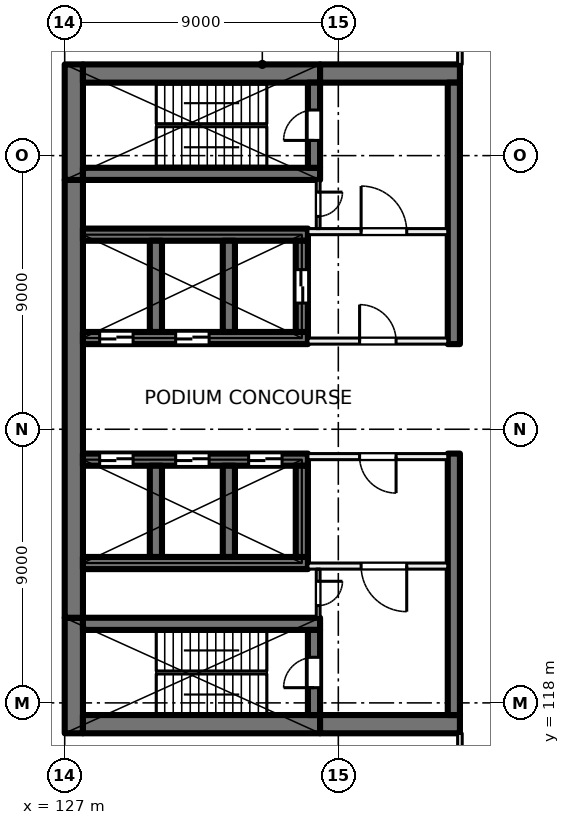
"""IFC4 building model, lengths in metres.
Left out: names, types, materials, properties, quantities, classifications, styles, units other than length and angle.
Written with IfcOpenShell. Run it as: python <this file> out.ifc"""

import sys

from ifc_helpers import new_model, si_unit, direction, frame, frame_2d, origin, place, context, subcontext, project, spatial, rectangle, extrude, element, fill, save


model = new_model("IFC4")
c1 = context("Model", 3, precision=1e-05, world=origin(), true_north=direction((0.0, 1.0)))
c2 = subcontext(c1, "Body", "Model", "MODEL_VIEW")
j1 = project(units=[si_unit("LENGTHUNIT", "METRE"), si_unit("PLANEANGLEUNIT", "RADIAN")], contexts=[c1])
p1 = place(None, origin())
s1 = spatial("IfcSite", under=j1, at=p1, CompositionType="ELEMENT")
p2 = place(p1, origin())
s2 = spatial("IfcBuilding", under=s1, at=p2, CompositionType="ELEMENT")
p3 = place(p2, frame((0.0, 0.0, 22.5)))
s3 = spatial("IfcBuildingStorey", under=s2, at=p3, CompositionType="ELEMENT", Elevation=22.5)
p4 = place(p3, frame((127.3, 117.0, 0.0), z_axis=(0.0, 0.0, 1.0), x_axis=(0.0, 1.0, 0.0)))
e1 = element("IfcWall", 1, at=p4, inside=s3, PredefinedType="SHEAR", context=c2, shape_type="SweptSolid", body=[
    extrude(rectangle(XDim=3.8, YDim=0.6, at=frame_2d((1.9, 0.0))), origin(), (0.0, 0.0, 1.0), 5.0),
])
p5 = place(p3, frame((127.3, 120.8, 0.0), z_axis=(0.0, 0.0, 1.0), x_axis=(0.0, 1.0, 0.0)))
e2 = element("IfcWall", 2, at=p5, inside=s3, PredefinedType="SHEAR", context=c2, shape_type="SweptSolid", body=[
    extrude(rectangle(XDim=14.4, YDim=0.6, at=frame_2d((7.2, 0.0))), origin(), (0.0, 0.0, 1.0), 5.0),
])
p6 = place(p3, frame((127.3, 135.2, 0.0), z_axis=(0.0, 0.0, 1.0), x_axis=(0.0, 1.0, 0.0)))
e3 = element("IfcWall", 3, at=p6, inside=s3, PredefinedType="SHEAR", context=c2, shape_type="SweptSolid", body=[
    extrude(rectangle(XDim=3.8, YDim=0.6, at=frame_2d((1.9, 0.0))), origin(), (0.0, 0.0, 1.0), 5.0),
])
for number, where, z_axis, x_axis in (
    (4, (127.6, 117.3, 0.0), (0.0, 0.0, 1.0), (1.0, 0.0, 0.0)),
    (5, (127.6, 138.7, 0.0), (0.0, 0.0, 1.0), (1.0, 0.0, 0.0)),
):
    element("IfcWall", number, at=place(p3, frame(where, z_axis=z_axis, x_axis=x_axis)), inside=s3, PredefinedType="SHEAR", context=c2, shape_type="SweptSolid", body=[
        extrude(rectangle(XDim=7.8, YDim=0.6, at=frame_2d((3.9, 0.0))), origin(), (0.0, 0.0, 1.0), 5.0),
    ])
for number, where, z_axis, x_axis in (
    (6, (135.4, 117.3, 0.0), (0.0, 0.0, 1.0), (1.0, 0.0, 0.0)),
    (7, (135.4, 138.7, 0.0), (0.0, 0.0, 1.0), (1.0, 0.0, 0.0)),
):
    element("IfcWall", number, at=place(p3, frame(where, z_axis=z_axis, x_axis=x_axis)), inside=s3, PredefinedType="SHEAR", context=c2, shape_type="SweptSolid", body=[
        extrude(rectangle(XDim=4.6, YDim=0.6, at=frame_2d((2.3, 0.0))), origin(), (0.0, 0.0, 1.0), 5.0),
    ])
p7 = place(p3, frame((127.6, 120.6, 0.0), z_axis=(0.0, 0.0, 1.0), x_axis=(1.0, 0.0, 0.0)))
e8 = element("IfcWall", 8, at=p7, inside=s3, PredefinedType="SHEAR", context=c2, shape_type="SweptSolid", body=[
    extrude(rectangle(XDim=7.8, YDim=0.4, at=frame_2d((3.9, 0.0))), origin(), (0.0, 0.0, 1.0), 5.0),
])
p8 = place(p3, frame((135.2, 117.6, 0.0), z_axis=(0.0, 0.0, 1.0), x_axis=(0.0, 1.0, 0.0)))
e9 = element("IfcWall", 9, at=p8, inside=s3, PredefinedType="SHEAR", context=c2, shape_type="SweptSolid", body=[
    extrude(rectangle(XDim=2.8, YDim=0.4, at=frame_2d((1.4, 0.0))), origin(), (0.0, 0.0, 1.0), 5.0),
])
p9 = place(p8, frame((0.9, 0.0, 0.0)))
e10 = element("IfcOpeningElement", 10, at=p9, cuts=e9, PredefinedType="OPENING", context=c2, shape_type="SweptSolid", body=[
    extrude(rectangle(XDim=1.0, YDim=2.1, at=frame_2d((0.5, 1.05))), frame((0.0, 0.21, 0.0), z_axis=(0.0, -1.0, 0.0), x_axis=(1.0, 0.0, 0.0)), (0.0, 0.0, 1.0), 0.42),
])
p10 = place(p3, frame((127.6, 135.4, 0.0), z_axis=(0.0, 0.0, 1.0), x_axis=(1.0, 0.0, 0.0)))
e11 = element("IfcWall", 11, at=p10, inside=s3, PredefinedType="SHEAR", context=c2, shape_type="SweptSolid", body=[
    extrude(rectangle(XDim=7.8, YDim=0.4, at=frame_2d((3.9, 0.0))), origin(), (0.0, 0.0, 1.0), 5.0),
])
p11 = place(p3, frame((135.2, 135.6, 0.0), z_axis=(0.0, 0.0, 1.0), x_axis=(0.0, 1.0, 0.0)))
e12 = element("IfcWall", 12, at=p11, inside=s3, PredefinedType="SHEAR", context=c2, shape_type="SweptSolid", body=[
    extrude(rectangle(XDim=2.8, YDim=0.4, at=frame_2d((1.4, 0.0))), origin(), (0.0, 0.0, 1.0), 5.0),
])
p12 = place(p11, frame((0.9, 0.0, 0.0)))
e13 = element("IfcOpeningElement", 13, at=p12, cuts=e12, PredefinedType="OPENING", context=c2, shape_type="SweptSolid", body=[
    extrude(rectangle(XDim=1.0, YDim=2.1, at=frame_2d((0.5, 1.05))), frame((0.0, 0.21, 0.0), z_axis=(0.0, -1.0, 0.0), x_axis=(1.0, 0.0, 0.0)), (0.0, 0.0, 1.0), 0.42),
])
p13 = place(p3, frame((127.6, 126.0, 0.0), z_axis=(0.0, 0.0, 1.0), x_axis=(1.0, 0.0, 0.0)))
e14 = element("IfcWall", 14, at=p13, inside=s3, PredefinedType="SHEAR", context=c2, shape_type="SweptSolid", body=[
    extrude(rectangle(XDim=7.4, YDim=0.4, at=frame_2d((3.7, 0.0))), origin(), (0.0, 0.0, 1.0), 5.0),
])
p14 = place(p13, frame((0.55, 0.0, 0.0)))
e15 = element("IfcOpeningElement", 15, at=p14, cuts=e14, PredefinedType="OPENING", context=c2, shape_type="SweptSolid", body=[
    extrude(rectangle(XDim=1.1, YDim=2.1, at=frame_2d((0.55, 1.05))), frame((0.0, 0.21, 0.0), z_axis=(0.0, -1.0, 0.0), x_axis=(1.0, 0.0, 0.0)), (0.0, 0.0, 1.0), 0.42),
])
p15 = place(p13, frame((3.05, 0.0, 0.0)))
e16 = element("IfcOpeningElement", 16, at=p15, cuts=e14, PredefinedType="OPENING", context=c2, shape_type="SweptSolid", body=[
    extrude(rectangle(XDim=1.1, YDim=2.1, at=frame_2d((0.55, 1.05))), frame((0.0, 0.21, 0.0), z_axis=(0.0, -1.0, 0.0), x_axis=(1.0, 0.0, 0.0)), (0.0, 0.0, 1.0), 0.42),
])
p16 = place(p13, frame((5.45, 0.0, 0.0)))
e17 = element("IfcOpeningElement", 17, at=p16, cuts=e14, PredefinedType="OPENING", context=c2, shape_type="SweptSolid", body=[
    extrude(rectangle(XDim=1.1, YDim=2.1, at=frame_2d((0.55, 1.05))), frame((0.0, 0.21, 0.0), z_axis=(0.0, -1.0, 0.0), x_axis=(1.0, 0.0, 0.0)), (0.0, 0.0, 1.0), 0.42),
])
p17 = place(p3, frame((127.6, 122.6, 0.0), z_axis=(0.0, 0.0, 1.0), x_axis=(1.0, 0.0, 0.0)))
e18 = element("IfcWall", 18, at=p17, inside=s3, PredefinedType="SHEAR", context=c2, shape_type="SweptSolid", body=[
    extrude(rectangle(XDim=7.4, YDim=0.4, at=frame_2d((3.7, 0.0))), origin(), (0.0, 0.0, 1.0), 5.0),
])
for number, where, z_axis, x_axis in (
    (19, (130.0, 122.8, 0.0), (0.0, 0.0, 1.0), (0.0, 1.0, 0.0)),
    (20, (132.4, 122.8, 0.0), (0.0, 0.0, 1.0), (0.0, 1.0, 0.0)),
    (21, (134.8, 122.8, 0.0), (0.0, 0.0, 1.0), (0.0, 1.0, 0.0)),
):
    element("IfcWall", number, at=place(p3, frame(where, z_axis=z_axis, x_axis=x_axis)), inside=s3, PredefinedType="SHEAR", context=c2, shape_type="SweptSolid", body=[
        extrude(rectangle(XDim=3.0, YDim=0.4, at=frame_2d((1.5, 0.0))), origin(), (0.0, 0.0, 1.0), 5.0),
    ])
p18 = place(p3, frame((127.6, 130.0, 0.0), z_axis=(0.0, 0.0, 1.0), x_axis=(1.0, 0.0, 0.0)))
e22 = element("IfcWall", 22, at=p18, inside=s3, PredefinedType="SHEAR", context=c2, shape_type="SweptSolid", body=[
    extrude(rectangle(XDim=7.4, YDim=0.4, at=frame_2d((3.7, 0.0))), origin(), (0.0, 0.0, 1.0), 5.0),
])
p19 = place(p18, frame((0.55, 0.0, 0.0)))
e23 = element("IfcOpeningElement", 23, at=p19, cuts=e22, PredefinedType="OPENING", context=c2, shape_type="SweptSolid", body=[
    extrude(rectangle(XDim=1.1, YDim=2.1, at=frame_2d((0.55, 1.05))), frame((0.0, 0.21, 0.0), z_axis=(0.0, -1.0, 0.0), x_axis=(1.0, 0.0, 0.0)), (0.0, 0.0, 1.0), 0.42),
])
p20 = place(p18, frame((3.05, 0.0, 0.0)))
e24 = element("IfcOpeningElement", 24, at=p20, cuts=e22, PredefinedType="OPENING", context=c2, shape_type="SweptSolid", body=[
    extrude(rectangle(XDim=1.1, YDim=2.1, at=frame_2d((0.55, 1.05))), frame((0.0, 0.21, 0.0), z_axis=(0.0, -1.0, 0.0), x_axis=(1.0, 0.0, 0.0)), (0.0, 0.0, 1.0), 0.42),
])
p21 = place(p3, frame((127.6, 133.4, 0.0), z_axis=(0.0, 0.0, 1.0), x_axis=(1.0, 0.0, 0.0)))
e25 = element("IfcWall", 25, at=p21, inside=s3, PredefinedType="SHEAR", context=c2, shape_type="SweptSolid", body=[
    extrude(rectangle(XDim=7.4, YDim=0.4, at=frame_2d((3.7, 0.0))), origin(), (0.0, 0.0, 1.0), 5.0),
])
for number, where, z_axis, x_axis in (
    (26, (130.0, 130.2, 0.0), (0.0, 0.0, 1.0), (0.0, 1.0, 0.0)),
    (27, (132.4, 130.2, 0.0), (0.0, 0.0, 1.0), (0.0, 1.0, 0.0)),
):
    element("IfcWall", number, at=place(p3, frame(where, z_axis=z_axis, x_axis=x_axis)), inside=s3, PredefinedType="SHEAR", context=c2, shape_type="SweptSolid", body=[
        extrude(rectangle(XDim=3.0, YDim=0.4, at=frame_2d((1.5, 0.0))), origin(), (0.0, 0.0, 1.0), 5.0),
    ])
p22 = place(p3, frame((134.8, 130.2, 0.0), z_axis=(0.0, 0.0, 1.0), x_axis=(0.0, 1.0, 0.0)))
e28 = element("IfcWall", 28, at=p22, inside=s3, PredefinedType="SHEAR", context=c2, shape_type="SweptSolid", body=[
    extrude(rectangle(XDim=3.0, YDim=0.4, at=frame_2d((1.5, 0.0))), origin(), (0.0, 0.0, 1.0), 5.0),
])
p23 = place(p22, frame((0.95, 0.0, 0.0)))
e29 = element("IfcOpeningElement", 29, at=p23, cuts=e28, PredefinedType="OPENING", context=c2, shape_type="SweptSolid", body=[
    extrude(rectangle(XDim=1.1, YDim=2.1, at=frame_2d((0.55, 1.05))), frame((0.0, 0.21, 0.0), z_axis=(0.0, -1.0, 0.0), x_axis=(1.0, 0.0, 0.0)), (0.0, 0.0, 1.0), 0.42),
])
for number, where, z_axis, x_axis in (
    (30, (139.8, 117.6, 0.0), (0.0, 0.0, 1.0), (0.0, 1.0, 0.0)),
    (31, (139.8, 129.8, 0.0), (0.0, 0.0, 1.0), (0.0, 1.0, 0.0)),
):
    element("IfcWall", number, at=place(p3, frame(where, z_axis=z_axis, x_axis=x_axis)), inside=s3, PredefinedType="SHEAR", context=c2, shape_type="SweptSolid", body=[
        extrude(rectangle(XDim=8.6, YDim=0.4, at=frame_2d((4.3, 0.0))), origin(), (0.0, 0.0, 1.0), 5.0),
    ])
p24 = place(p3, frame((135.0, 129.9, 0.0), z_axis=(0.0, 0.0, 1.0), x_axis=(1.0, 0.0, 0.0)))
e32 = element("IfcWall", 32, at=p24, inside=s3, PredefinedType="PARTITIONING", context=c2, shape_type="SweptSolid", body=[
    extrude(rectangle(XDim=4.6, YDim=0.2, at=frame_2d((2.3, 0.0))), origin(), (0.0, 0.0, 1.0), 4.625),
])
p25 = place(p24, frame((1.7, 0.0, 0.0)))
e33 = element("IfcOpeningElement", 33, at=p25, cuts=e32, PredefinedType="OPENING", context=c2, shape_type="SweptSolid", body=[
    extrude(rectangle(XDim=1.2, YDim=2.1, at=frame_2d((0.6, 1.05))), frame((0.0, 0.11, 0.0), z_axis=(0.0, -1.0, 0.0), x_axis=(1.0, 0.0, 0.0)), (0.0, 0.0, 1.0), 0.22),
])
p26 = place(p3, frame((135.0, 133.5, 0.0), z_axis=(0.0, 0.0, 1.0), x_axis=(1.0, 0.0, 0.0)))
e34 = element("IfcWall", 34, at=p26, inside=s3, PredefinedType="PARTITIONING", context=c2, shape_type="SweptSolid", body=[
    extrude(rectangle(XDim=4.6, YDim=0.2, at=frame_2d((2.3, 0.0))), origin(), (0.0, 0.0, 1.0), 4.625),
])
p27 = place(p26, frame((1.75, 0.0, 0.0)))
e35 = element("IfcOpeningElement", 35, at=p27, cuts=e34, PredefinedType="OPENING", context=c2, shape_type="SweptSolid", body=[
    extrude(rectangle(XDim=1.5, YDim=2.1, at=frame_2d((0.75, 1.05))), frame((0.0, 0.11, 0.0), z_axis=(0.0, -1.0, 0.0), x_axis=(1.0, 0.0, 0.0)), (0.0, 0.0, 1.0), 0.22),
])
p28 = place(p3, frame((135.337, 135.2, 0.0), z_axis=(0.0, 0.0, 1.0), x_axis=(0.0, -1.0, 0.0)))
e36 = element("IfcWall", 36, at=p28, inside=s3, PredefinedType="PARTITIONING", context=c2, shape_type="SweptSolid", body=[
    extrude(rectangle(XDim=1.6, YDim=0.125, at=frame_2d((0.8, 0.0))), origin(), (0.0, 0.0, 1.0), 4.625),
])
p29 = place(p28, frame((0.4, 0.0, 0.0)))
e37 = element("IfcOpeningElement", 37, at=p29, cuts=e36, PredefinedType="OPENING", context=c2, shape_type="SweptSolid", body=[
    extrude(rectangle(XDim=0.8, YDim=2.1, at=frame_2d((0.4, 1.05))), frame((0.0, 0.073, 0.0), z_axis=(0.0, -1.0, 0.0), x_axis=(1.0, 0.0, 0.0)), (0.0, 0.0, 1.0), 0.145),
])
p30 = place(p3, frame((139.6, 126.1, 0.0), z_axis=(0.0, 0.0, 1.0), x_axis=(-1.0, 0.0, 0.0)))
e38 = element("IfcWall", 38, at=p30, inside=s3, PredefinedType="PARTITIONING", context=c2, shape_type="SweptSolid", body=[
    extrude(rectangle(XDim=4.6, YDim=0.2, at=frame_2d((2.3, 0.0))), origin(), (0.0, 0.0, 1.0), 4.625),
])
p31 = place(p30, frame((1.7, 0.0, 0.0)))
e39 = element("IfcOpeningElement", 39, at=p31, cuts=e38, PredefinedType="OPENING", context=c2, shape_type="SweptSolid", body=[
    extrude(rectangle(XDim=1.2, YDim=2.1, at=frame_2d((0.6, 1.05))), frame((0.0, 0.11, 0.0), z_axis=(0.0, -1.0, 0.0), x_axis=(1.0, 0.0, 0.0)), (0.0, 0.0, 1.0), 0.22),
])
p32 = place(p3, frame((139.6, 122.5, 0.0), z_axis=(0.0, 0.0, 1.0), x_axis=(-1.0, 0.0, 0.0)))
e40 = element("IfcWall", 40, at=p32, inside=s3, PredefinedType="PARTITIONING", context=c2, shape_type="SweptSolid", body=[
    extrude(rectangle(XDim=4.6, YDim=0.2, at=frame_2d((2.3, 0.0))), origin(), (0.0, 0.0, 1.0), 4.625),
])
p33 = place(p32, frame((1.35, 0.0, 0.0)))
e41 = element("IfcOpeningElement", 41, at=p33, cuts=e40, PredefinedType="OPENING", context=c2, shape_type="SweptSolid", body=[
    extrude(rectangle(XDim=1.5, YDim=2.1, at=frame_2d((0.75, 1.05))), frame((0.0, 0.11, 0.0), z_axis=(0.0, -1.0, 0.0), x_axis=(1.0, 0.0, 0.0)), (0.0, 0.0, 1.0), 0.22),
])
p34 = place(p3, frame((135.337, 122.4, 0.0), z_axis=(0.0, 0.0, 1.0), x_axis=(0.0, -1.0, 0.0)))
e42 = element("IfcWall", 42, at=p34, inside=s3, PredefinedType="PARTITIONING", context=c2, shape_type="SweptSolid", body=[
    extrude(rectangle(XDim=1.6, YDim=0.125, at=frame_2d((0.8, 0.0))), origin(), (0.0, 0.0, 1.0), 4.625),
])
p35 = place(p34, frame((0.4, 0.0, 0.0)))
e43 = element("IfcOpeningElement", 43, at=p35, cuts=e42, PredefinedType="OPENING", context=c2, shape_type="SweptSolid", body=[
    extrude(rectangle(XDim=0.8, YDim=2.1, at=frame_2d((0.4, 1.05))), frame((0.0, 0.073, 0.0), z_axis=(0.0, -1.0, 0.0), x_axis=(1.0, 0.0, 0.0)), (0.0, 0.0, 1.0), 0.145),
])
p36 = place(p3, frame((140.0, 102.925, 0.0), z_axis=(0.0, 0.0, 1.0), x_axis=(0.0, 1.0, 0.0)))
e44 = element("IfcWall", 44, at=p36, inside=s3, PredefinedType="PARTITIONING", context=c2, shape_type="SweptSolid", body=[
    extrude(rectangle(XDim=14.075, YDim=0.15, at=frame_2d((7.038, 0.0))), origin(), (0.0, 0.0, 1.0), 4.625),
])
p37 = place(p36, frame((10.675, 0.0, 0.0)))
e45 = element("IfcOpeningElement", 45, at=p37, cuts=e44, PredefinedType="OPENING", context=c2, shape_type="SweptSolid", body=[
    extrude(rectangle(XDim=1.8, YDim=2.1, at=frame_2d((0.9, 1.05))), frame((0.0, 0.085, 0.0), z_axis=(0.0, -1.0, 0.0), x_axis=(1.0, 0.0, 0.0)), (0.0, 0.0, 1.0), 0.17),
])
p38 = place(p3, frame((140.0, 139.0, 0.0), z_axis=(0.0, 0.0, 1.0), x_axis=(0.0, 1.0, 0.0)))
e46 = element("IfcWall", 46, at=p38, inside=s3, PredefinedType="PARTITIONING", context=c2, shape_type="SweptSolid", body=[
    extrude(rectangle(XDim=14.4, YDim=0.15, at=frame_2d((7.2, 0.0))), origin(), (0.0, 0.0, 1.0), 4.625),
])
p39 = place(p19, origin())
e47 = element("IfcDoor", 47, at=p39, inside=s3, OperationType="DOUBLE_DOOR_SLIDING", PredefinedType="DOOR", context=c2, shape_type="SweptSolid", body=[
    extrude(rectangle(XDim=1.1, YDim=2.1, at=frame_2d((0.55, 1.05))), frame((0.0, 0.025, 0.0), z_axis=(0.0, -1.0, 0.0), x_axis=(1.0, 0.0, 0.0)), (0.0, 0.0, 1.0), 0.05),
])
fill(e23, e47)
p40 = place(p20, origin())
e48 = element("IfcDoor", 48, at=p40, inside=s3, OperationType="DOUBLE_DOOR_SLIDING", PredefinedType="DOOR", context=c2, shape_type="SweptSolid", body=[
    extrude(rectangle(XDim=1.1, YDim=2.1, at=frame_2d((0.55, 1.05))), frame((0.0, 0.025, 0.0), z_axis=(0.0, -1.0, 0.0), x_axis=(1.0, 0.0, 0.0)), (0.0, 0.0, 1.0), 0.05),
])
fill(e24, e48)
p41 = place(p14, origin())
e49 = element("IfcDoor", 49, at=p41, inside=s3, OperationType="DOUBLE_DOOR_SLIDING", PredefinedType="DOOR", context=c2, shape_type="SweptSolid", body=[
    extrude(rectangle(XDim=1.1, YDim=2.1, at=frame_2d((0.55, 1.05))), frame((0.0, 0.025, 0.0), z_axis=(0.0, -1.0, 0.0), x_axis=(1.0, 0.0, 0.0)), (0.0, 0.0, 1.0), 0.05),
])
fill(e15, e49)
p42 = place(p15, origin())
e50 = element("IfcDoor", 50, at=p42, inside=s3, OperationType="DOUBLE_DOOR_SLIDING", PredefinedType="DOOR", context=c2, shape_type="SweptSolid", body=[
    extrude(rectangle(XDim=1.1, YDim=2.1, at=frame_2d((0.55, 1.05))), frame((0.0, 0.025, 0.0), z_axis=(0.0, -1.0, 0.0), x_axis=(1.0, 0.0, 0.0)), (0.0, 0.0, 1.0), 0.05),
])
fill(e16, e50)
p43 = place(p16, origin())
e51 = element("IfcDoor", 51, at=p43, inside=s3, OperationType="DOUBLE_DOOR_SLIDING", PredefinedType="DOOR", context=c2, shape_type="SweptSolid", body=[
    extrude(rectangle(XDim=1.1, YDim=2.1, at=frame_2d((0.55, 1.05))), frame((0.0, 0.025, 0.0), z_axis=(0.0, -1.0, 0.0), x_axis=(1.0, 0.0, 0.0)), (0.0, 0.0, 1.0), 0.05),
])
fill(e17, e51)
p44 = place(p25, origin())
e52 = element("IfcDoor", 52, at=p44, inside=s3, OperationType="DOUBLE_DOOR_SINGLE_SWING", PredefinedType="DOOR", context=c2, shape_type="SweptSolid", body=[
    extrude(rectangle(XDim=1.2, YDim=2.1, at=frame_2d((0.6, 1.05))), frame((0.0, 0.025, 0.0), z_axis=(0.0, -1.0, 0.0), x_axis=(1.0, 0.0, 0.0)), (0.0, 0.0, 1.0), 0.05),
])
fill(e33, e52)
p45 = place(p27, origin())
e53 = element("IfcDoor", 53, at=p45, inside=s3, OperationType="DOUBLE_DOOR_SINGLE_SWING", PredefinedType="DOOR", context=c2, shape_type="SweptSolid", body=[
    extrude(rectangle(XDim=1.5, YDim=2.1, at=frame_2d((0.75, 1.05))), frame((0.0, 0.025, 0.0), z_axis=(0.0, -1.0, 0.0), x_axis=(1.0, 0.0, 0.0)), (0.0, 0.0, 1.0), 0.05),
])
fill(e35, e53)
p46 = place(p12, origin())
e54 = element("IfcDoor", 54, at=p46, inside=s3, OperationType="SINGLE_SWING_LEFT", PredefinedType="DOOR", context=c2, shape_type="SweptSolid", body=[
    extrude(rectangle(XDim=1.0, YDim=2.1, at=frame_2d((0.5, 1.05))), frame((0.0, 0.025, 0.0), z_axis=(0.0, -1.0, 0.0), x_axis=(1.0, 0.0, 0.0)), (0.0, 0.0, 1.0), 0.05),
])
fill(e13, e54)
p47 = place(p29, origin())
e55 = element("IfcDoor", 55, at=p47, inside=s3, OperationType="SINGLE_SWING_RIGHT", PredefinedType="DOOR", context=c2, shape_type="SweptSolid", body=[
    extrude(rectangle(XDim=0.8, YDim=2.1, at=frame_2d((0.4, 1.05))), frame((0.0, 0.025, 0.0), z_axis=(0.0, -1.0, 0.0), x_axis=(1.0, 0.0, 0.0)), (0.0, 0.0, 1.0), 0.05),
])
fill(e37, e55)
p48 = place(p31, origin())
e56 = element("IfcDoor", 56, at=p48, inside=s3, OperationType="DOUBLE_DOOR_SINGLE_SWING", PredefinedType="DOOR", context=c2, shape_type="SweptSolid", body=[
    extrude(rectangle(XDim=1.2, YDim=2.1, at=frame_2d((0.6, 1.05))), frame((0.0, 0.025, 0.0), z_axis=(0.0, -1.0, 0.0), x_axis=(1.0, 0.0, 0.0)), (0.0, 0.0, 1.0), 0.05),
])
fill(e39, e56)
p49 = place(p33, origin())
e57 = element("IfcDoor", 57, at=p49, inside=s3, OperationType="DOUBLE_DOOR_SINGLE_SWING", PredefinedType="DOOR", context=c2, shape_type="SweptSolid", body=[
    extrude(rectangle(XDim=1.5, YDim=2.1, at=frame_2d((0.75, 1.05))), frame((0.0, 0.025, 0.0), z_axis=(0.0, -1.0, 0.0), x_axis=(1.0, 0.0, 0.0)), (0.0, 0.0, 1.0), 0.05),
])
fill(e41, e57)
p50 = place(p9, origin())
e58 = element("IfcDoor", 58, at=p50, inside=s3, OperationType="SINGLE_SWING_RIGHT", PredefinedType="DOOR", context=c2, shape_type="SweptSolid", body=[
    extrude(rectangle(XDim=1.0, YDim=2.1, at=frame_2d((0.5, 1.05))), frame((0.0, 0.025, 0.0), z_axis=(0.0, -1.0, 0.0), x_axis=(1.0, 0.0, 0.0)), (0.0, 0.0, 1.0), 0.05),
])
fill(e10, e58)
p51 = place(p35, origin())
e59 = element("IfcDoor", 59, at=p51, inside=s3, OperationType="SINGLE_SWING_LEFT", PredefinedType="DOOR", context=c2, shape_type="SweptSolid", body=[
    extrude(rectangle(XDim=0.8, YDim=2.1, at=frame_2d((0.4, 1.05))), frame((0.0, 0.025, 0.0), z_axis=(0.0, -1.0, 0.0), x_axis=(1.0, 0.0, 0.0)), (0.0, 0.0, 1.0), 0.05),
])
fill(e43, e59)
p52 = place(p23, origin())
e60 = element("IfcDoor", 60, at=p52, inside=s3, OperationType="DOUBLE_DOOR_SLIDING", PredefinedType="DOOR", context=c2, shape_type="SweptSolid", body=[
    extrude(rectangle(XDim=1.1, YDim=2.1, at=frame_2d((0.55, 1.05))), frame((0.0, 0.025, 0.0), z_axis=(0.0, -1.0, 0.0), x_axis=(1.0, 0.0, 0.0)), (0.0, 0.0, 1.0), 0.05),
])
fill(e29, e60)
save(model, sys.argv[1])
